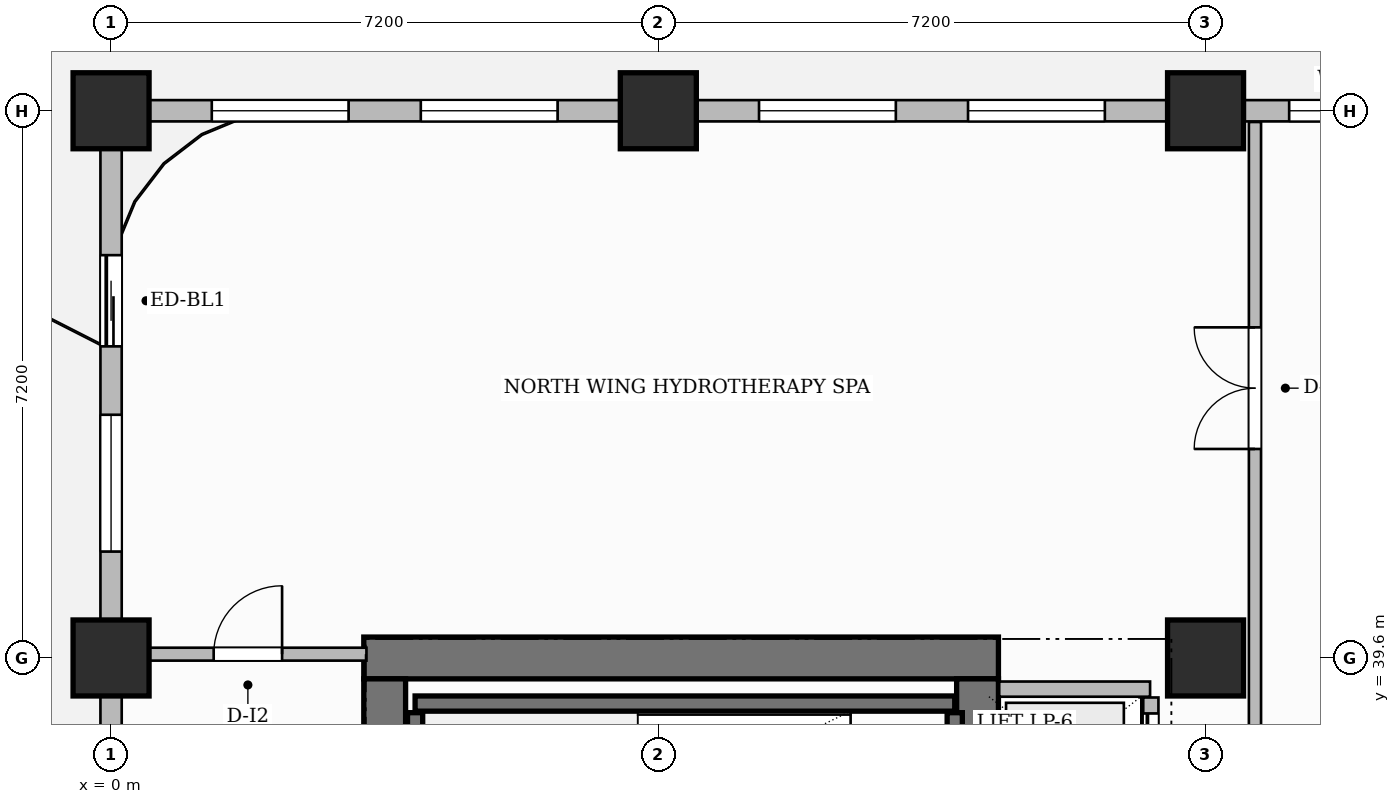
"""IFC4 building model, lengths in metres.
Left out: names, types, materials, properties, quantities, classifications, styles, units other than length and angle.
Written with IfcOpenShell. Run it as: python <this file> out.ifc"""

import sys

from ifc_helpers import new_model, si_unit, direction, frame, frame_2d, origin, origin_2d, place, context, subcontext, project, spatial, rectangle, extrude, source, transform, mapped, element, fill, save


model = new_model("IFC4")
c1 = context("Model", 3, precision=1e-05, world=origin(), true_north=direction((0.0, 1.0)))
c2 = subcontext(c1, "Body", "Model", "MODEL_VIEW")
j1 = project(units=[si_unit("LENGTHUNIT", "METRE"), si_unit("PLANEANGLEUNIT", "RADIAN")], contexts=[c1])
p1 = place(None, origin())
s1 = spatial("IfcSite", under=j1, at=p1, CompositionType="ELEMENT")
p2 = place(p1, origin())
s2 = spatial("IfcBuilding", under=s1, at=p2, CompositionType="ELEMENT")
p3 = place(p2, frame((0.0, 0.0, 134.0)))
s3 = spatial("IfcBuildingStorey", under=s2, at=p3, CompositionType="ELEMENT", Elevation=134.0)
p4 = place(p3, frame((3.325, 39.6, 0.0), z_axis=(0.0, 0.0, 1.0), x_axis=(1.0, 0.0, 0.0)))
e1 = element("IfcWall", 1, at=p4, inside=s3, PredefinedType="SHEAR", context=c2, shape_type="SweptSolid", body=[
    extrude(rectangle(XDim=8.35, YDim=0.55, at=frame_2d((4.175, 0.0))), origin(), (0.0, 0.0, 1.0), 3.7),
])
p5 = place(p3, frame((3.6, 25.475, 0.0), z_axis=(0.0, 0.0, 1.0), x_axis=(0.0, 1.0, 0.0)))
e2 = element("IfcWall", 2, at=p5, inside=s3, PredefinedType="SHEAR", context=c2, shape_type="SweptSolid", body=[
    extrude(rectangle(XDim=13.85, YDim=0.55, at=frame_2d((6.925, 0.0))), origin(), (0.0, 0.0, 1.0), 3.7),
])
p6 = place(p3, frame((11.4, 25.475, 0.0), z_axis=(0.0, 0.0, 1.0), x_axis=(0.0, 1.0, 0.0)))
e3 = element("IfcWall", 3, at=p6, inside=s3, PredefinedType="SHEAR", context=c2, shape_type="SweptSolid", body=[
    extrude(rectangle(XDim=13.85, YDim=0.55, at=frame_2d((6.925, 0.0))), origin(), (0.0, 0.0, 1.0), 3.7),
])
p7 = place(p6, frame((6.495, 0.0, 0.0)))
e4 = element("IfcOpeningElement", 4, at=p7, cuts=e3, PredefinedType="OPENING", context=c2, shape_type="SweptSolid", body=[
    extrude(rectangle(XDim=1.5, YDim=2.2, at=frame_2d((0.75, 1.1))), frame((0.0, 0.285, 0.0), z_axis=(0.0, -1.0, 0.0), x_axis=(1.0, 0.0, 0.0)), (0.0, 0.0, 1.0), 0.57),
])
m1 = source(origin(), c2, "Body", "SweptSolid", [
    extrude(rectangle(XDim=1.0, YDim=1.0, at=origin_2d()), origin(), (0.0, 0.0, 1.0), 3.7),
])
for number, where, z_axis, x_axis in (
    (5, (0.0, 39.6, 0.0), (0.0, 0.0, 1.0), (1.0, 0.0, 0.0)),
    (6, (0.0, 46.8, 0.0), (0.0, 0.0, 1.0), (1.0, 0.0, 0.0)),
    (7, (7.2, 46.8, 0.0), (0.0, 0.0, 1.0), (1.0, 0.0, 0.0)),
    (8, (14.4, 39.6, 0.0), (0.0, 0.0, 1.0), (1.0, 0.0, 0.0)),
    (9, (14.4, 46.8, 0.0), (0.0, 0.0, 1.0), (1.0, 0.0, 0.0)),
):
    element("IfcColumn", number, at=place(p3, frame(where, z_axis=z_axis, x_axis=x_axis)), inside=s3, PredefinedType="COLUMN", context=c2, shape_type="MappedRepresentation", body=[
        mapped(m1, transform((0.0, 0.0, 0.0), scale=1.0)),
    ])
p8 = place(p3, frame((4.0, 39.0, 0.0), z_axis=(0.0, 0.0, 1.0), x_axis=(1.0, 0.0, 0.0)))
e10 = element("IfcWall", 10, at=p8, inside=s3, PredefinedType="SHEAR", context=c2, shape_type="SweptSolid", body=[
    extrude(rectangle(XDim=7.1, YDim=0.2, at=frame_2d((3.55, 0.0))), origin(), (0.0, 0.0, 1.0), 3.7),
])
for number, where, z_axis, x_axis in (
    (11, (4.0, 36.18, 0.0), (0.0, 0.0, 1.0), (0.0, 1.0, 0.0)),
    (12, (11.1, 36.18, 0.0), (0.0, 0.0, 1.0), (0.0, 1.0, 0.0)),
):
    element("IfcWall", number, at=place(p3, frame(where, z_axis=z_axis, x_axis=x_axis)), inside=s3, PredefinedType="SHEAR", context=c2, shape_type="SweptSolid", body=[
        extrude(rectangle(XDim=2.7, YDim=0.2, at=frame_2d((1.35, 0.0))), origin(), (0.0, 0.0, 1.0), 3.7),
    ])
p9 = place(p3, frame((11.685, 39.19, 0.0), z_axis=(0.0, 0.0, 1.0), x_axis=(1.0, 0.0, 0.0)))
e13 = element("IfcWall", 13, at=p9, inside=s3, PredefinedType="PARTITIONING", context=c2, shape_type="SweptSolid", body=[
    extrude(rectangle(XDim=1.985, YDim=0.2, at=frame_2d((0.992, 0.0))), origin(), (0.0, 0.0, 1.0), 3.45),
])
p10 = place(p3, frame((13.68, 34.36, 0.0), z_axis=(0.0, 0.0, 1.0), x_axis=(0.0, 1.0, 0.0)))
e14 = element("IfcWall", 14, at=p10, inside=s3, PredefinedType="PARTITIONING", context=c2, shape_type="SweptSolid", body=[
    extrude(rectangle(XDim=4.72, YDim=0.2, at=frame_2d((2.36, 0.0))), origin(), (0.0, 0.0, 1.0), 3.45),
])
p11 = place(p10, frame((0.21, 0.0, 0.0)))
e15 = element("IfcOpeningElement", 15, at=p11, cuts=e14, PredefinedType="OPENING", context=c2, shape_type="SweptSolid", body=[
    extrude(rectangle(XDim=1.1, YDim=2.2, at=frame_2d((0.55, 1.1))), frame((0.0, 0.11, 0.0), z_axis=(0.0, -1.0, 0.0), x_axis=(1.0, 0.0, 0.0)), (0.0, 0.0, 1.0), 0.22),
])
p12 = place(p10, frame((1.81, 0.0, 0.0)))
e16 = element("IfcOpeningElement", 16, at=p12, cuts=e14, PredefinedType="OPENING", context=c2, shape_type="SweptSolid", body=[
    extrude(rectangle(XDim=1.1, YDim=2.2, at=frame_2d((0.55, 1.1))), frame((0.0, 0.11, 0.0), z_axis=(0.0, -1.0, 0.0), x_axis=(1.0, 0.0, 0.0)), (0.0, 0.0, 1.0), 0.22),
])
p13 = place(p10, frame((3.41, 0.0, 0.0)))
e17 = element("IfcOpeningElement", 17, at=p13, cuts=e14, PredefinedType="OPENING", context=c2, shape_type="SweptSolid", body=[
    extrude(rectangle(XDim=1.1, YDim=2.2, at=frame_2d((0.55, 1.1))), frame((0.0, 0.11, 0.0), z_axis=(0.0, -1.0, 0.0), x_axis=(1.0, 0.0, 0.0)), (0.0, 0.0, 1.0), 0.22),
])
p14 = place(p3, frame((0.24, 39.65, 0.0), z_axis=(0.0, 0.0, 1.0), x_axis=(1.0, 0.0, 0.0)))
e18 = element("IfcWall", 18, at=p14, inside=s3, PredefinedType="PARTITIONING", context=c2, shape_type="SweptSolid", body=[
    extrude(rectangle(XDim=3.12, YDim=0.17, at=frame_2d((1.56, 0.0))), origin(), (0.0, 0.0, 1.0), 3.45),
])
p15 = place(p14, frame((1.11, 0.0, 0.0)))
e19 = element("IfcOpeningElement", 19, at=p15, cuts=e18, PredefinedType="OPENING", context=c2, shape_type="SweptSolid", body=[
    extrude(rectangle(XDim=0.9, YDim=2.15, at=frame_2d((0.45, 1.075))), frame((0.0, 0.095, 0.0), z_axis=(0.0, -1.0, 0.0), x_axis=(1.0, 0.0, 0.0)), (0.0, 0.0, 1.0), 0.19),
])
p16 = place(p3, frame((15.05, 34.34, 0.0), z_axis=(0.0, 0.0, 1.0), x_axis=(0.0, 1.0, 0.0)))
e20 = element("IfcWall", 20, at=p16, inside=s3, PredefinedType="PARTITIONING", context=c2, shape_type="SweptSolid", body=[
    extrude(rectangle(XDim=12.312, YDim=0.16, at=frame_2d((6.156, 0.0))), origin(), (0.0, 0.0, 1.0), 3.45),
])
p17 = place(p16, frame((8.01, 0.0, 0.0)))
e21 = element("IfcOpeningElement", 21, at=p17, cuts=e20, PredefinedType="OPENING", context=c2, shape_type="SweptSolid", body=[
    extrude(rectangle(XDim=1.6, YDim=2.4, at=frame_2d((0.8, 1.2))), frame((0.0, 0.09, 0.0), z_axis=(0.0, -1.0, 0.0), x_axis=(1.0, 0.0, 0.0)), (0.0, 0.0, 1.0), 0.18),
])
p18 = place(p3, frame((0.0, 25.25, 0.0), z_axis=(0.0, 0.0, 1.0), x_axis=(0.0, 1.0, 0.0)))
e22 = element("IfcWall", 22, at=p18, inside=s3, PredefinedType="SOLIDWALL", context=c2, shape_type="SweptSolid", body=[
    extrude(rectangle(XDim=21.5, YDim=0.28, at=frame_2d((10.75, 0.0))), origin(), (0.0, 0.0, 1.0), 2.935),
])
p19 = place(p18, frame((18.45, 0.0, 0.0)))
e23 = element("IfcOpeningElement", 23, at=p19, cuts=e22, PredefinedType="OPENING", context=c2, shape_type="SweptSolid", body=[
    extrude(rectangle(XDim=1.2, YDim=2.2, at=frame_2d((0.6, 1.1))), frame((0.0, 0.15, 0.0), z_axis=(0.0, -1.0, 0.0), x_axis=(1.0, 0.0, 0.0)), (0.0, 0.0, 1.0), 0.3),
])
p20 = place(p18, frame((0.8, 0.0, 0.0)))
e24 = element("IfcOpeningElement", 24, at=p20, cuts=e22, PredefinedType="OPENING", context=c2, shape_type="SweptSolid", body=[
    extrude(rectangle(XDim=1.2, YDim=2.2, at=frame_2d((0.6, 1.1))), frame((0.0, 0.15, 0.0), z_axis=(0.0, -1.0, 0.0), x_axis=(1.0, 0.0, 0.0)), (0.0, 0.0, 1.0), 0.3),
])
p21 = place(p18, frame((3.425, 0.0, 0.8)))
e25 = element("IfcOpeningElement", 25, at=p21, cuts=e22, PredefinedType="OPENING", context=c2, shape_type="SweptSolid", body=[
    extrude(rectangle(XDim=1.8, YDim=1.85, at=frame_2d((0.9, 0.925))), frame((0.0, 0.15, 0.0), z_axis=(0.0, -1.0, 0.0), x_axis=(1.0, 0.0, 0.0)), (0.0, 0.0, 1.0), 0.3),
])
p22 = place(p18, frame((8.475, 0.0, 0.8)))
e26 = element("IfcOpeningElement", 26, at=p22, cuts=e22, PredefinedType="OPENING", context=c2, shape_type="SweptSolid", body=[
    extrude(rectangle(XDim=1.8, YDim=1.85, at=frame_2d((0.9, 0.925))), frame((0.0, 0.15, 0.0), z_axis=(0.0, -1.0, 0.0), x_axis=(1.0, 0.0, 0.0)), (0.0, 0.0, 1.0), 0.3),
])
p23 = place(p18, frame((11.225, 0.0, 0.8)))
e27 = element("IfcOpeningElement", 27, at=p23, cuts=e22, PredefinedType="OPENING", context=c2, shape_type="SweptSolid", body=[
    extrude(rectangle(XDim=1.8, YDim=1.85, at=frame_2d((0.9, 0.925))), frame((0.0, 0.15, 0.0), z_axis=(0.0, -1.0, 0.0), x_axis=(1.0, 0.0, 0.0)), (0.0, 0.0, 1.0), 0.3),
])
p24 = place(p18, frame((15.75, 0.0, 0.8)))
e28 = element("IfcOpeningElement", 28, at=p24, cuts=e22, PredefinedType="OPENING", context=c2, shape_type="SweptSolid", body=[
    extrude(rectangle(XDim=1.8, YDim=1.85, at=frame_2d((0.9, 0.925))), frame((0.0, 0.15, 0.0), z_axis=(0.0, -1.0, 0.0), x_axis=(1.0, 0.0, 0.0)), (0.0, 0.0, 1.0), 0.3),
])
p25 = place(p3, frame((0.0, 46.8, 0.0), z_axis=(0.0, 0.0, 1.0), x_axis=(1.0, 0.0, 0.0)))
e29 = element("IfcWall", 29, at=p25, inside=s3, PredefinedType="SOLIDWALL", context=c2, shape_type="SweptSolid", body=[
    extrude(rectangle(XDim=18.0, YDim=0.28, at=frame_2d((9.0, 0.0))), origin(), (0.0, 0.0, 1.0), 2.935),
])
p26 = place(p25, frame((1.325, 0.0, 0.8)))
e30 = element("IfcOpeningElement", 30, at=p26, cuts=e29, PredefinedType="OPENING", context=c2, shape_type="SweptSolid", body=[
    extrude(rectangle(XDim=1.8, YDim=1.85, at=frame_2d((0.9, 0.925))), frame((0.0, 0.15, 0.0), z_axis=(0.0, -1.0, 0.0), x_axis=(1.0, 0.0, 0.0)), (0.0, 0.0, 1.0), 0.3),
])
p27 = place(p25, frame((4.075, 0.0, 0.8)))
e31 = element("IfcOpeningElement", 31, at=p27, cuts=e29, PredefinedType="OPENING", context=c2, shape_type="SweptSolid", body=[
    extrude(rectangle(XDim=1.8, YDim=1.85, at=frame_2d((0.9, 0.925))), frame((0.0, 0.15, 0.0), z_axis=(0.0, -1.0, 0.0), x_axis=(1.0, 0.0, 0.0)), (0.0, 0.0, 1.0), 0.3),
])
p28 = place(p25, frame((8.525, 0.0, 0.8)))
e32 = element("IfcOpeningElement", 32, at=p28, cuts=e29, PredefinedType="OPENING", context=c2, shape_type="SweptSolid", body=[
    extrude(rectangle(XDim=1.8, YDim=1.85, at=frame_2d((0.9, 0.925))), frame((0.0, 0.15, 0.0), z_axis=(0.0, -1.0, 0.0), x_axis=(1.0, 0.0, 0.0)), (0.0, 0.0, 1.0), 0.3),
])
p29 = place(p25, frame((11.275, 0.0, 0.8)))
e33 = element("IfcOpeningElement", 33, at=p29, cuts=e29, PredefinedType="OPENING", context=c2, shape_type="SweptSolid", body=[
    extrude(rectangle(XDim=1.8, YDim=1.85, at=frame_2d((0.9, 0.925))), frame((0.0, 0.15, 0.0), z_axis=(0.0, -1.0, 0.0), x_axis=(1.0, 0.0, 0.0)), (0.0, 0.0, 1.0), 0.3),
])
p30 = place(p25, frame((15.5, 0.0, 0.8)))
e34 = element("IfcOpeningElement", 34, at=p30, cuts=e29, PredefinedType="OPENING", context=c2, shape_type="SweptSolid", body=[
    extrude(rectangle(XDim=1.4, YDim=1.85, at=frame_2d((0.7, 0.925))), frame((0.0, 0.15, 0.0), z_axis=(0.0, -1.0, 0.0), x_axis=(1.0, 0.0, 0.0)), (0.0, 0.0, 1.0), 0.3),
])
m2 = source(origin(), c2, "Body", "SweptSolid", [
    extrude(rectangle(XDim=0.9, YDim=2.15, at=frame_2d((0.45, 1.075))), frame((0.0, 0.025, 0.0), z_axis=(0.0, -1.0, 0.0), x_axis=(1.0, 0.0, 0.0)), (0.0, 0.0, 1.0), 0.05),
])
p31 = place(p15, origin())
e35 = element("IfcDoor", 35, at=p31, inside=s3, OperationType="SINGLE_SWING_RIGHT", PredefinedType="DOOR", context=c2, shape_type="MappedRepresentation", body=[
    mapped(m2, transform((0.0, 0.0, 0.0), scale=1.0)),
])
fill(e19, e35)
m3 = source(origin(), c2, "Body", "SweptSolid", [
    extrude(rectangle(XDim=1.6, YDim=2.4, at=frame_2d((0.8, 1.2))), frame((0.0, 0.025, 0.0), z_axis=(0.0, -1.0, 0.0), x_axis=(1.0, 0.0, 0.0)), (0.0, 0.0, 1.0), 0.05),
])
p32 = place(p17, origin())
e36 = element("IfcDoor", 36, at=p32, inside=s3, OperationType="DOUBLE_DOOR_SINGLE_SWING", PredefinedType="DOOR", context=c2, shape_type="MappedRepresentation", body=[
    mapped(m3, transform((0.0, 0.0, 0.0), scale=1.0)),
])
fill(e21, e36)
m4 = source(origin(), c2, "Body", "SweptSolid", [
    extrude(rectangle(XDim=1.1, YDim=2.2, at=frame_2d((0.55, 1.1))), frame((0.0, 0.025, 0.0), z_axis=(0.0, -1.0, 0.0), x_axis=(1.0, 0.0, 0.0)), (0.0, 0.0, 1.0), 0.05),
])
p33 = place(p13, origin())
e37 = element("IfcDoor", 37, at=p33, inside=s3, OperationType="SLIDING_TO_LEFT", PredefinedType="DOOR", context=c2, shape_type="MappedRepresentation", body=[
    mapped(m4, transform((0.0, 0.0, 0.0), scale=1.0)),
])
fill(e17, e37)
m5 = source(origin(), c2, "Body", "SweptSolid", [
    extrude(rectangle(XDim=1.2, YDim=2.2, at=frame_2d((0.6, 1.1))), frame((0.0, 0.025, 0.0), z_axis=(0.0, -1.0, 0.0), x_axis=(1.0, 0.0, 0.0)), (0.0, 0.0, 1.0), 0.05),
])
p34 = place(p19, origin())
e38 = element("IfcDoor", 38, at=p34, inside=s3, OperationType="SLIDING_TO_LEFT", PredefinedType="DOOR", context=c2, shape_type="MappedRepresentation", body=[
    mapped(m5, transform((0.0, 0.0, 0.0), scale=1.0)),
])
fill(e23, e38)
m6 = source(origin(), c2, "Body", "SweptSolid", [
    extrude(rectangle(XDim=1.8, YDim=1.85, at=frame_2d((0.9, 0.925))), frame((0.0, 0.03, 0.0), z_axis=(0.0, -1.0, 0.0), x_axis=(1.0, 0.0, 0.0)), (0.0, 0.0, 1.0), 0.06),
])
p35 = place(p24, origin())
e39 = element("IfcWindow", 39, at=p35, inside=s3, PartitioningType="DOUBLE_PANEL_VERTICAL", PredefinedType="WINDOW", context=c2, shape_type="MappedRepresentation", body=[
    mapped(m6, transform((0.0, 0.0, 0.0), scale=1.0)),
])
fill(e28, e39)
p36 = place(p26, origin())
e40 = element("IfcWindow", 40, at=p36, inside=s3, PartitioningType="DOUBLE_PANEL_VERTICAL", PredefinedType="WINDOW", context=c2, shape_type="MappedRepresentation", body=[
    mapped(m6, transform((0.0, 0.0, 0.0), scale=1.0)),
])
fill(e30, e40)
p37 = place(p27, origin())
e41 = element("IfcWindow", 41, at=p37, inside=s3, PartitioningType="DOUBLE_PANEL_VERTICAL", PredefinedType="WINDOW", context=c2, shape_type="MappedRepresentation", body=[
    mapped(m6, transform((0.0, 0.0, 0.0), scale=1.0)),
])
fill(e31, e41)
p38 = place(p28, origin())
e42 = element("IfcWindow", 42, at=p38, inside=s3, PartitioningType="DOUBLE_PANEL_VERTICAL", PredefinedType="WINDOW", context=c2, shape_type="MappedRepresentation", body=[
    mapped(m6, transform((0.0, 0.0, 0.0), scale=1.0)),
])
fill(e32, e42)
p39 = place(p29, origin())
e43 = element("IfcWindow", 43, at=p39, inside=s3, PartitioningType="DOUBLE_PANEL_VERTICAL", PredefinedType="WINDOW", context=c2, shape_type="MappedRepresentation", body=[
    mapped(m6, transform((0.0, 0.0, 0.0), scale=1.0)),
])
fill(e33, e43)
m7 = source(origin(), c2, "Body", "SweptSolid", [
    extrude(rectangle(XDim=1.4, YDim=1.85, at=frame_2d((0.7, 0.925))), frame((0.0, 0.03, 0.0), z_axis=(0.0, -1.0, 0.0), x_axis=(1.0, 0.0, 0.0)), (0.0, 0.0, 1.0), 0.06),
])
p40 = place(p30, origin())
e44 = element("IfcWindow", 44, at=p40, inside=s3, PartitioningType="SINGLE_PANEL", PredefinedType="WINDOW", context=c2, shape_type="MappedRepresentation", body=[
    mapped(m7, transform((0.0, 0.0, 0.0), scale=1.0)),
])
fill(e34, e44)
save(model, sys.argv[1])
